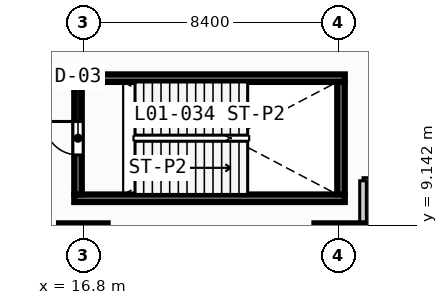
"""IFC4 building model, lengths in metres.
Left out: names, types, materials, properties, quantities, classifications, styles, units other than length and angle.
Written with IfcOpenShell. Run it as: python <this file> out.ifc"""

import sys

from ifc_helpers import new_model, si_unit, direction, frame, frame_2d, origin, origin_2d, place, context, subcontext, project, spatial, rectangle, extrude, element, fill, save


model = new_model("IFC4")
c1 = context("Model", 3, precision=1e-05, world=origin(), true_north=direction((0.0, 1.0)))
c2 = subcontext(c1, "Body", "Model", "MODEL_VIEW")
j1 = project(units=[si_unit("LENGTHUNIT", "METRE"), si_unit("PLANEANGLEUNIT", "RADIAN")], contexts=[c1])
p1 = place(None, origin())
s1 = spatial("IfcSite", under=j1, at=p1, CompositionType="ELEMENT")
p2 = place(p1, origin())
s2 = spatial("IfcBuilding", under=s1, at=p2, CompositionType="ELEMENT")
p3 = place(p2, frame((0.0, 0.0, 6.0)))
s3 = spatial("IfcBuildingStorey", under=s2, at=p3, CompositionType="ELEMENT", Elevation=6.0)
for number, where, z_axis, x_axis in (
    (1, (16.5, 10.025, 0.0), (0.0, 0.0, 1.0), (1.0, 0.0, 0.0)),
    (2, (16.5, 13.975, 0.0), (0.0, 0.0, 1.0), (1.0, 0.0, 0.0)),
):
    element("IfcWall", number, at=place(p3, frame(where, z_axis=z_axis, x_axis=x_axis)), inside=s3, PredefinedType="SOLIDWALL", context=c2, shape_type="SweptSolid", body=[
        extrude(rectangle(XDim=8.9, YDim=0.25, at=frame_2d((4.45, 0.0))), origin(), (0.0, 0.0, 1.0), 4.45),
    ])
p4 = place(p3, frame((25.275, 10.15, 0.0), z_axis=(0.0, 0.0, 1.0), x_axis=(0.0, 1.0, 0.0)))
e3 = element("IfcWall", 3, at=p4, inside=s3, PredefinedType="SOLIDWALL", context=c2, shape_type="SweptSolid", body=[
    extrude(rectangle(XDim=3.7, YDim=0.25, at=frame_2d((1.85, 0.0))), origin(), (0.0, 0.0, 1.0), 4.45),
])
for number, where, z_axis, x_axis in (
    (4, (16.8, 8.4, 0.0), (0.0, 0.0, 1.0), (1.0, 0.0, 0.0)),
    (5, (25.2, 8.4, 0.0), (0.0, 0.0, 1.0), (1.0, 0.0, 0.0)),
):
    element("IfcColumn", number, at=place(p3, frame(where, z_axis=z_axis, x_axis=x_axis)), inside=s3, PredefinedType="COLUMN", context=c2, shape_type="SweptSolid", body=[
        extrude(rectangle(XDim=1.6, YDim=1.6, at=origin_2d()), origin(), (0.0, 0.0, 1.0), 4.8),
    ])
p5 = place(p3, frame((16.625, 10.15, 0.0), z_axis=(0.0, 0.0, 1.0), x_axis=(0.0, 1.0, 0.0)))
e6 = element("IfcWall", 6, at=p5, inside=s3, PredefinedType="SOLIDWALL", context=c2, shape_type="SweptSolid", body=[
    extrude(rectangle(XDim=3.7, YDim=0.25, at=frame_2d((1.85, 0.0))), origin(), (0.0, 0.0, 1.0), 4.45),
])
p6 = place(p5, frame((1.3, 0.0, 0.0)))
e7 = element("IfcOpeningElement", 7, at=p6, cuts=e6, PredefinedType="OPENING", context=c2, shape_type="SweptSolid", body=[
    extrude(rectangle(XDim=1.1, YDim=2.15, at=frame_2d((0.55, 1.075))), frame((0.0, 0.135, 0.0), z_axis=(0.0, -1.0, 0.0), x_axis=(1.0, 0.0, 0.0)), (0.0, 0.0, 1.0), 0.27),
])
p7 = place(p3, frame((26.0, 10.6, 0.0), z_axis=(0.0, 0.0, 1.0), x_axis=(1.0, 0.0, 0.0)))
e8 = element("IfcWall", 8, at=p7, inside=s3, PredefinedType="PARTITIONING", context=c2, shape_type="SweptSolid", body=[
    extrude(rectangle(XDim=63.0, YDim=0.2, at=frame_2d((31.5, 0.0))), origin(), (0.0, 0.0, 1.0), 4.45),
])
p8 = place(p7, frame((3.6, 0.0, 0.0)))
e9 = element("IfcOpeningElement", 9, at=p8, cuts=e8, PredefinedType="OPENING", context=c2, shape_type="SweptSolid", body=[
    extrude(rectangle(XDim=2.0, YDim=2.15, at=frame_2d((1.0, 1.075))), frame((0.0, 0.11, 0.0), z_axis=(0.0, -1.0, 0.0), x_axis=(1.0, 0.0, 0.0)), (0.0, 0.0, 1.0), 0.22),
])
p9 = place(p7, frame((19.6, 0.0, 0.0)))
e10 = element("IfcOpeningElement", 10, at=p9, cuts=e8, PredefinedType="OPENING", context=c2, shape_type="SweptSolid", body=[
    extrude(rectangle(XDim=2.0, YDim=2.15, at=frame_2d((1.0, 1.075))), frame((0.0, 0.11, 0.0), z_axis=(0.0, -1.0, 0.0), x_axis=(1.0, 0.0, 0.0)), (0.0, 0.0, 1.0), 0.22),
])
p10 = place(p7, frame((36.4, 0.0, 0.0)))
e11 = element("IfcOpeningElement", 11, at=p10, cuts=e8, PredefinedType="OPENING", context=c2, shape_type="SweptSolid", body=[
    extrude(rectangle(XDim=2.0, YDim=2.15, at=frame_2d((1.0, 1.075))), frame((0.0, 0.11, 0.0), z_axis=(0.0, -1.0, 0.0), x_axis=(1.0, 0.0, 0.0)), (0.0, 0.0, 1.0), 0.22),
])
p11 = place(p7, frame((53.2, 0.0, 0.0)))
e12 = element("IfcOpeningElement", 12, at=p11, cuts=e8, PredefinedType="OPENING", context=c2, shape_type="SweptSolid", body=[
    extrude(rectangle(XDim=2.0, YDim=2.15, at=frame_2d((1.0, 1.075))), frame((0.0, 0.11, 0.0), z_axis=(0.0, -1.0, 0.0), x_axis=(1.0, 0.0, 0.0)), (0.0, 0.0, 1.0), 0.22),
])
p12 = place(p3, frame((26.0, 0.35, 0.0), z_axis=(0.0, 0.0, 1.0), x_axis=(0.0, 1.0, 0.0)))
e13 = element("IfcWall", 13, at=p12, inside=s3, PredefinedType="PARTITIONING", context=c2, shape_type="SweptSolid", body=[
    extrude(rectangle(XDim=10.25, YDim=0.22, at=frame_2d((5.125, 0.0))), origin(), (0.0, 0.0, 1.0), 4.45),
])
p13 = place(p6, origin())
e14 = element("IfcDoor", 14, at=p13, inside=s3, OperationType="SINGLE_SWING_RIGHT", PredefinedType="DOOR", context=c2, shape_type="SweptSolid", body=[
    extrude(rectangle(XDim=1.1, YDim=2.15, at=frame_2d((0.55, 1.075))), frame((0.0, 0.025, 0.0), z_axis=(0.0, -1.0, 0.0), x_axis=(1.0, 0.0, 0.0)), (0.0, 0.0, 1.0), 0.05),
])
fill(e7, e14)
save(model, sys.argv[1])
